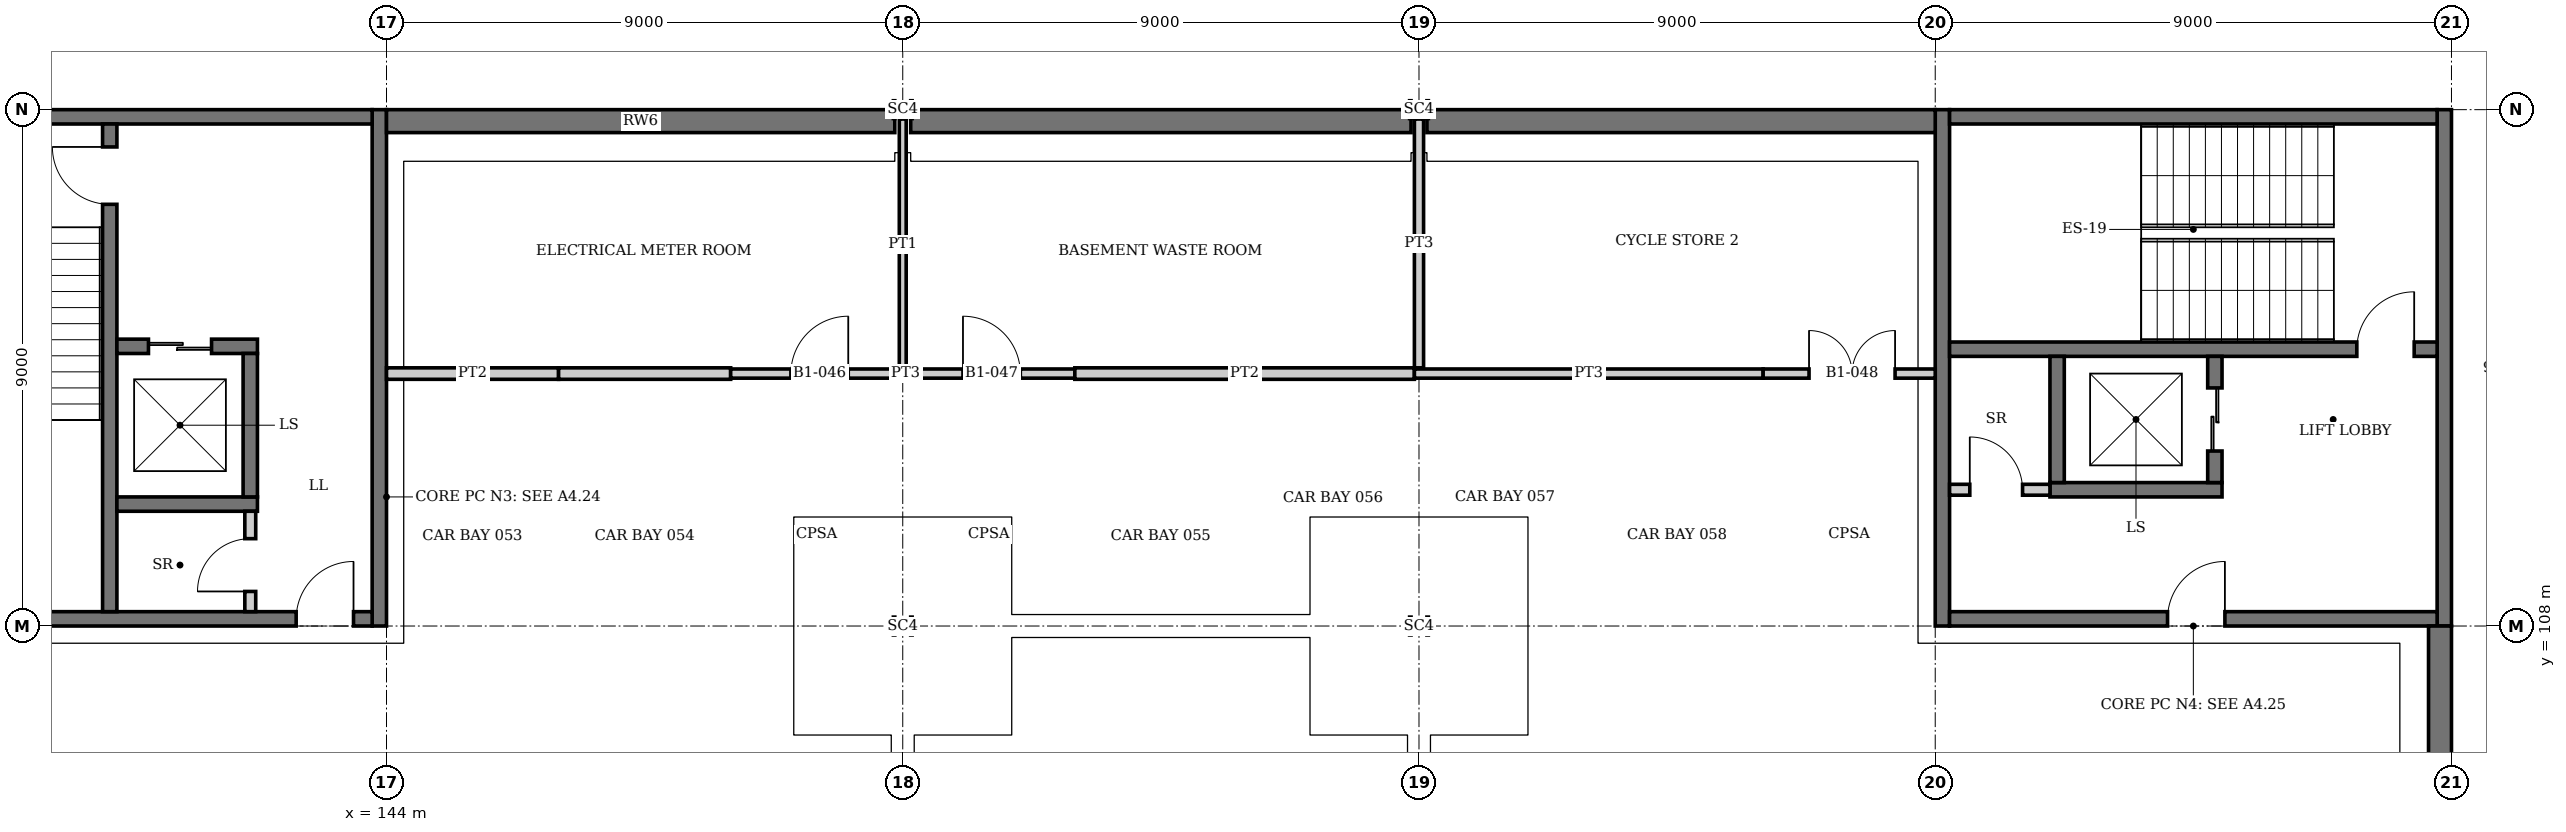
"""IFC4 building model, lengths in metres.
Left out: names, types, materials, properties, quantities, classifications, styles, units other than length and angle.
Written with IfcOpenShell. Run it as: python <this file> out.ifc"""

import sys

from ifc_helpers import new_model, si_unit, direction, frame, frame_2d, origin, origin_2d, place, context, subcontext, project, spatial, rectangle, i_section, extrude, element, fill, save


model = new_model("IFC4")
c1 = context("Model", 3, precision=1e-05, world=origin(), true_north=direction((0.0, 1.0)))
c2 = subcontext(c1, "Body", "Model", "MODEL_VIEW")
j1 = project(units=[si_unit("LENGTHUNIT", "METRE"), si_unit("PLANEANGLEUNIT", "RADIAN")], contexts=[c1])
p1 = place(None, origin())
s1 = spatial("IfcSite", under=j1, at=p1, CompositionType="ELEMENT")
p2 = place(p1, origin())
s2 = spatial("IfcBuilding", under=s1, at=p2, CompositionType="ELEMENT")
p3 = place(p2, frame((0.0, 0.0, -4.5)))
s3 = spatial("IfcBuildingStorey", under=s2, at=p3, CompositionType="ELEMENT", Elevation=-4.5)
for number, where, z_axis, x_axis in (
    (1, (153.0, 108.0, 0.0), (0.0, 0.0, 1.0), (0.0, 1.0, 0.0)),
    (2, (153.0, 117.0, 0.0), (0.0, 0.0, 1.0), (0.0, 1.0, 0.0)),
    (3, (162.0, 108.0, 0.0), (0.0, 0.0, 1.0), (0.0, 1.0, 0.0)),
    (4, (162.0, 117.0, 0.0), (0.0, 0.0, 1.0), (0.0, 1.0, 0.0)),
):
    element("IfcColumn", number, at=place(p3, frame(where, z_axis=z_axis, x_axis=x_axis)), inside=s3, PredefinedType="COLUMN", context=c2, shape_type="SweptSolid", body=[
        extrude(i_section(OverallWidth=0.311, OverallDepth=0.327, WebThickness=0.016, FlangeThickness=0.025, at=origin_2d()), origin(), (0.0, 0.0, 1.0), 4.5),
    ])
p4 = place(p3, frame((143.875, 108.0, 0.0), z_axis=(0.0, 0.0, 1.0), x_axis=(0.0, 1.0, 0.0)))
e5 = element("IfcWall", 5, at=p4, inside=s3, PredefinedType="SHEAR", context=c2, shape_type="SweptSolid", body=[
    extrude(rectangle(XDim=9.0, YDim=0.25, at=frame_2d((4.5, 0.0))), origin(), (0.0, 0.0, 1.0), 4.5),
])
p5 = place(p3, frame((135.25, 108.125, 0.0), z_axis=(0.0, 0.0, 1.0), x_axis=(1.0, 0.0, 0.0)))
e6 = element("IfcWall", 6, at=p5, inside=s3, PredefinedType="SHEAR", context=c2, shape_type="SweptSolid", body=[
    extrude(rectangle(XDim=8.5, YDim=0.25, at=frame_2d((4.25, 0.0))), origin(), (0.0, 0.0, 1.0), 4.5),
])
p6 = place(p5, frame((7.175, 0.0, 0.0)))
e7 = element("IfcOpeningElement", 7, at=p6, cuts=e6, PredefinedType="OPENING", context=c2, shape_type="SweptSolid", body=[
    extrude(rectangle(XDim=1.0, YDim=2.1, at=frame_2d((0.5, 1.05))), frame((0.0, 0.135, 0.0), z_axis=(0.0, -1.0, 0.0), x_axis=(1.0, 0.0, 0.0)), (0.0, 0.0, 1.0), 0.27),
])
p7 = place(p3, frame((135.25, 116.875, 0.0), z_axis=(0.0, 0.0, 1.0), x_axis=(1.0, 0.0, 0.0)))
e8 = element("IfcWall", 8, at=p7, inside=s3, PredefinedType="SHEAR", context=c2, shape_type="SweptSolid", body=[
    extrude(rectangle(XDim=8.5, YDim=0.25, at=frame_2d((4.25, 0.0))), origin(), (0.0, 0.0, 1.0), 4.5),
])
for number, where, z_axis, x_axis in (
    (9, (171.125, 108.0, 0.0), (0.0, 0.0, 1.0), (0.0, 1.0, 0.0)),
    (10, (179.875, 108.0, 0.0), (0.0, 0.0, 1.0), (0.0, 1.0, 0.0)),
):
    element("IfcWall", number, at=place(p3, frame(where, z_axis=z_axis, x_axis=x_axis)), inside=s3, PredefinedType="SHEAR", context=c2, shape_type="SweptSolid", body=[
        extrude(rectangle(XDim=9.0, YDim=0.25, at=frame_2d((4.5, 0.0))), origin(), (0.0, 0.0, 1.0), 4.5),
    ])
p8 = place(p3, frame((171.25, 108.125, 0.0), z_axis=(0.0, 0.0, 1.0), x_axis=(1.0, 0.0, 0.0)))
e11 = element("IfcWall", 11, at=p8, inside=s3, PredefinedType="SHEAR", context=c2, shape_type="SweptSolid", body=[
    extrude(rectangle(XDim=8.5, YDim=0.25, at=frame_2d((4.25, 0.0))), origin(), (0.0, 0.0, 1.0), 4.5),
])
p9 = place(p8, frame((3.8, 0.0, 0.0)))
e12 = element("IfcOpeningElement", 12, at=p9, cuts=e11, PredefinedType="OPENING", context=c2, shape_type="SweptSolid", body=[
    extrude(rectangle(XDim=1.0, YDim=2.1, at=frame_2d((0.5, 1.05))), frame((0.0, 0.135, 0.0), z_axis=(0.0, -1.0, 0.0), x_axis=(1.0, 0.0, 0.0)), (0.0, 0.0, 1.0), 0.27),
])
p10 = place(p3, frame((171.25, 116.875, 0.0), z_axis=(0.0, 0.0, 1.0), x_axis=(1.0, 0.0, 0.0)))
e13 = element("IfcWall", 13, at=p10, inside=s3, PredefinedType="SHEAR", context=c2, shape_type="SweptSolid", body=[
    extrude(rectangle(XDim=8.5, YDim=0.25, at=frame_2d((4.25, 0.0))), origin(), (0.0, 0.0, 1.0), 4.5),
])
p11 = place(p3, frame((144.0, 116.8, 0.0), z_axis=(0.0, 0.0, 1.0), x_axis=(1.0, 0.0, 0.0)))
e14 = element("IfcWall", 14, at=p11, inside=s3, PredefinedType="SOLIDWALL", context=c2, shape_type="SweptSolid", body=[
    extrude(rectangle(XDim=8.862, YDim=0.4, at=frame_2d((4.431, 0.0))), origin(), (0.0, 0.0, 1.0), 4.5),
])
p12 = place(p3, frame((153.138, 116.8, 0.0), z_axis=(0.0, 0.0, 1.0), x_axis=(1.0, 0.0, 0.0)))
e15 = element("IfcWall", 15, at=p12, inside=s3, PredefinedType="SOLIDWALL", context=c2, shape_type="SweptSolid", body=[
    extrude(rectangle(XDim=8.723, YDim=0.4, at=frame_2d((4.362, 0.0))), origin(), (0.0, 0.0, 1.0), 4.5),
])
p13 = place(p3, frame((162.138, 116.8, 0.0), z_axis=(0.0, 0.0, 1.0), x_axis=(1.0, 0.0, 0.0)))
e16 = element("IfcWall", 16, at=p13, inside=s3, PredefinedType="SOLIDWALL", context=c2, shape_type="SweptSolid", body=[
    extrude(rectangle(XDim=8.862, YDim=0.4, at=frame_2d((4.431, 0.0))), origin(), (0.0, 0.0, 1.0), 4.5),
])
p14 = place(p3, frame((179.8, 99.008, 0.0), z_axis=(0.0, 0.0, 1.0), x_axis=(0.0, 1.0, 0.0)))
e17 = element("IfcWall", 17, at=p14, inside=s3, PredefinedType="SOLIDWALL", context=c2, shape_type="SweptSolid", body=[
    extrude(rectangle(XDim=8.992, YDim=0.4, at=frame_2d((4.496, 0.0))), origin(), (0.0, 0.0, 1.0), 4.5),
])
p15 = place(p3, frame((139.175, 116.75, 0.0), z_axis=(0.0, 0.0, 1.0), x_axis=(0.0, -1.0, 0.0)))
e18 = element("IfcWall", 18, at=p15, inside=s3, PredefinedType="SOLIDWALL", context=c2, shape_type="SweptSolid", body=[
    extrude(rectangle(XDim=8.5, YDim=0.25, at=frame_2d((4.25, 0.0))), origin(), (0.0, 0.0, 1.0), 4.25),
])
p16 = place(p15, frame((0.4, 0.0, 0.0)))
e19 = element("IfcOpeningElement", 19, at=p16, cuts=e18, PredefinedType="OPENING", context=c2, shape_type="SweptSolid", body=[
    extrude(rectangle(XDim=1.0, YDim=2.1, at=frame_2d((0.5, 1.05))), frame((0.0, 0.135, 0.0), z_axis=(0.0, -1.0, 0.0), x_axis=(1.0, 0.0, 0.0)), (0.0, 0.0, 1.0), 0.27),
])
p17 = place(p3, frame((139.3, 110.125, 0.0), z_axis=(0.0, 0.0, 1.0), x_axis=(1.0, 0.0, 0.0)))
e20 = element("IfcWall", 20, at=p17, inside=s3, PredefinedType="SOLIDWALL", context=c2, shape_type="SweptSolid", body=[
    extrude(rectangle(XDim=2.45, YDim=0.25, at=frame_2d((1.225, 0.0))), origin(), (0.0, 0.0, 1.0), 4.5),
])
p18 = place(p3, frame((139.3, 112.875, 0.0), z_axis=(0.0, 0.0, 1.0), x_axis=(1.0, 0.0, 0.0)))
e21 = element("IfcWall", 21, at=p18, inside=s3, PredefinedType="SOLIDWALL", context=c2, shape_type="SweptSolid", body=[
    extrude(rectangle(XDim=2.45, YDim=0.25, at=frame_2d((1.225, 0.0))), origin(), (0.0, 0.0, 1.0), 4.5),
])
p19 = place(p18, frame((0.55, 0.0, 0.0)))
e22 = element("IfcOpeningElement", 22, at=p19, cuts=e21, PredefinedType="OPENING", context=c2, shape_type="SweptSolid", body=[
    extrude(rectangle(XDim=1.1, YDim=2.1, at=frame_2d((0.55, 1.05))), frame((0.0, 0.135, 0.0), z_axis=(0.0, -1.0, 0.0), x_axis=(1.0, 0.0, 0.0)), (0.0, 0.0, 1.0), 0.27),
])
p20 = place(p3, frame((141.625, 110.25, 0.0), z_axis=(0.0, 0.0, 1.0), x_axis=(0.0, 1.0, 0.0)))
e23 = element("IfcWall", 23, at=p20, inside=s3, PredefinedType="SOLIDWALL", context=c2, shape_type="SweptSolid", body=[
    extrude(rectangle(XDim=2.5, YDim=0.25, at=frame_2d((1.25, 0.0))), origin(), (0.0, 0.0, 1.0), 4.5),
])
p21 = place(p3, frame((179.75, 112.825, 0.0), z_axis=(0.0, 0.0, 1.0), x_axis=(-1.0, 0.0, 0.0)))
e24 = element("IfcWall", 24, at=p21, inside=s3, PredefinedType="SOLIDWALL", context=c2, shape_type="SweptSolid", body=[
    extrude(rectangle(XDim=8.5, YDim=0.25, at=frame_2d((4.25, 0.0))), origin(), (0.0, 0.0, 1.0), 4.25),
])
p22 = place(p21, frame((0.4, 0.0, 0.0)))
e25 = element("IfcOpeningElement", 25, at=p22, cuts=e24, PredefinedType="OPENING", context=c2, shape_type="SweptSolid", body=[
    extrude(rectangle(XDim=1.0, YDim=2.1, at=frame_2d((0.5, 1.05))), frame((0.0, 0.135, 0.0), z_axis=(0.0, -1.0, 0.0), x_axis=(1.0, 0.0, 0.0)), (0.0, 0.0, 1.0), 0.27),
])
p23 = place(p3, frame((173.0, 110.375, 0.0), z_axis=(0.0, 0.0, 1.0), x_axis=(1.0, 0.0, 0.0)))
e26 = element("IfcWall", 26, at=p23, inside=s3, PredefinedType="SOLIDWALL", context=c2, shape_type="SweptSolid", body=[
    extrude(rectangle(XDim=3.0, YDim=0.25, at=frame_2d((1.5, 0.0))), origin(), (0.0, 0.0, 1.0), 4.5),
])
p24 = place(p3, frame((173.125, 110.5, 0.0), z_axis=(0.0, 0.0, 1.0), x_axis=(0.0, 1.0, 0.0)))
e27 = element("IfcWall", 27, at=p24, inside=s3, PredefinedType="SOLIDWALL", context=c2, shape_type="SweptSolid", body=[
    extrude(rectangle(XDim=2.2, YDim=0.25, at=frame_2d((1.1, 0.0))), origin(), (0.0, 0.0, 1.0), 4.5),
])
p25 = place(p3, frame((175.875, 110.5, 0.0), z_axis=(0.0, 0.0, 1.0), x_axis=(0.0, 1.0, 0.0)))
e28 = element("IfcWall", 28, at=p25, inside=s3, PredefinedType="SOLIDWALL", context=c2, shape_type="SweptSolid", body=[
    extrude(rectangle(XDim=2.2, YDim=0.25, at=frame_2d((1.1, 0.0))), origin(), (0.0, 0.0, 1.0), 4.5),
])
p26 = place(p25, frame((0.55, 0.0, 0.0)))
e29 = element("IfcOpeningElement", 29, at=p26, cuts=e28, PredefinedType="OPENING", context=c2, shape_type="SweptSolid", body=[
    extrude(rectangle(XDim=1.1, YDim=2.1, at=frame_2d((0.55, 1.05))), frame((0.0, 0.135, 0.0), z_axis=(0.0, -1.0, 0.0), x_axis=(1.0, 0.0, 0.0)), (0.0, 0.0, 1.0), 0.27),
])
p27 = place(p3, frame((171.25, 110.375, 0.0), z_axis=(0.0, 0.0, 1.0), x_axis=(1.0, 0.0, 0.0)))
e30 = element("IfcWall", 30, at=p27, inside=s3, PredefinedType="PARTITIONING", context=c2, shape_type="SweptSolid", body=[
    extrude(rectangle(XDim=1.75, YDim=0.19, at=frame_2d((0.875, 0.0))), origin(), (0.0, 0.0, 1.0), 4.25),
])
p28 = place(p27, frame((0.353, 0.0, 0.0)))
e31 = element("IfcOpeningElement", 31, at=p28, cuts=e30, PredefinedType="OPENING", context=c2, shape_type="SweptSolid", body=[
    extrude(rectangle(XDim=0.92, YDim=2.1, at=frame_2d((0.46, 1.05))), frame((0.0, 0.105, 0.0), z_axis=(0.0, -1.0, 0.0), x_axis=(1.0, 0.0, 0.0)), (0.0, 0.0, 1.0), 0.21),
])
p29 = place(p3, frame((144.0, 112.4, 0.0), z_axis=(0.0, 0.0, 1.0), x_axis=(1.0, 0.0, 0.0)))
e32 = element("IfcWall", 32, at=p29, inside=s3, PredefinedType="PARTITIONING", context=c2, shape_type="SweptSolid", body=[
    extrude(rectangle(XDim=3.0, YDim=0.2, at=frame_2d((1.5, 0.0))), origin(), (0.0, 0.0, 1.0), 4.25),
])
p30 = place(p3, frame((147.0, 112.4, 0.0), z_axis=(0.0, 0.0, 1.0), x_axis=(1.0, 0.0, 0.0)))
e33 = element("IfcWall", 33, at=p30, inside=s3, PredefinedType="PARTITIONING", context=c2, shape_type="SweptSolid", body=[
    extrude(rectangle(XDim=3.0, YDim=0.2, at=frame_2d((1.5, 0.0))), origin(), (0.0, 0.0, 1.0), 3.79),
])
p31 = place(p3, frame((150.0, 112.4, 0.0), z_axis=(0.0, 0.0, 1.0), x_axis=(1.0, 0.0, 0.0)))
e34 = element("IfcWall", 34, at=p31, inside=s3, PredefinedType="PARTITIONING", context=c2, shape_type="SweptSolid", body=[
    extrude(rectangle(XDim=6.0, YDim=0.16, at=frame_2d((3.0, 0.0))), origin(), (0.0, 0.0, 1.0), 3.79),
])
p32 = place(p31, frame((1.05, 0.0, 0.0)))
e35 = element("IfcOpeningElement", 35, at=p32, cuts=e34, PredefinedType="OPENING", context=c2, shape_type="SweptSolid", body=[
    extrude(rectangle(XDim=1.0, YDim=2.1, at=frame_2d((0.5, 1.05))), frame((0.0, 0.09, 0.0), z_axis=(0.0, -1.0, 0.0), x_axis=(1.0, 0.0, 0.0)), (0.0, 0.0, 1.0), 0.18),
])
p33 = place(p31, frame((4.05, 0.0, 0.0)))
e36 = element("IfcOpeningElement", 36, at=p33, cuts=e34, PredefinedType="OPENING", context=c2, shape_type="SweptSolid", body=[
    extrude(rectangle(XDim=1.0, YDim=2.1, at=frame_2d((0.5, 1.05))), frame((0.0, 0.09, 0.0), z_axis=(0.0, -1.0, 0.0), x_axis=(1.0, 0.0, 0.0)), (0.0, 0.0, 1.0), 0.18),
])
p34 = place(p3, frame((156.0, 112.4, 0.0), z_axis=(0.0, 0.0, 1.0), x_axis=(1.0, 0.0, 0.0)))
e37 = element("IfcWall", 37, at=p34, inside=s3, PredefinedType="PARTITIONING", context=c2, shape_type="SweptSolid", body=[
    extrude(rectangle(XDim=5.92, YDim=0.2, at=frame_2d((2.96, 0.0))), origin(), (0.0, 0.0, 1.0), 3.79),
])
p35 = place(p3, frame((161.92, 112.4, 0.0), z_axis=(0.0, 0.0, 1.0), x_axis=(1.0, 0.0, 0.0)))
e38 = element("IfcWall", 38, at=p35, inside=s3, PredefinedType="PARTITIONING", context=c2, shape_type="SweptSolid", body=[
    extrude(rectangle(XDim=6.08, YDim=0.16, at=frame_2d((3.04, 0.0))), origin(), (0.0, 0.0, 1.0), 3.79),
])
p36 = place(p3, frame((168.0, 112.4, 0.0), z_axis=(0.0, 0.0, 1.0), x_axis=(1.0, 0.0, 0.0)))
e39 = element("IfcWall", 39, at=p36, inside=s3, PredefinedType="PARTITIONING", context=c2, shape_type="SweptSolid", body=[
    extrude(rectangle(XDim=3.0, YDim=0.16, at=frame_2d((1.5, 0.0))), origin(), (0.0, 0.0, 1.0), 4.25),
])
p37 = place(p36, frame((0.8, 0.0, 0.0)))
e40 = element("IfcOpeningElement", 40, at=p37, cuts=e39, PredefinedType="OPENING", context=c2, shape_type="SweptSolid", body=[
    extrude(rectangle(XDim=1.5, YDim=2.1, at=frame_2d((0.75, 1.05))), frame((0.0, 0.09, 0.0), z_axis=(0.0, -1.0, 0.0), x_axis=(1.0, 0.0, 0.0)), (0.0, 0.0, 1.0), 0.18),
])
p38 = place(p3, frame((141.625, 108.25, 0.0), z_axis=(0.0, 0.0, 1.0), x_axis=(0.0, 1.0, 0.0)))
e41 = element("IfcWall", 41, at=p38, inside=s3, PredefinedType="PARTITIONING", context=c2, shape_type="SweptSolid", body=[
    extrude(rectangle(XDim=1.75, YDim=0.19, at=frame_2d((0.875, 0.0))), origin(), (0.0, 0.0, 1.0), 4.25),
])
p39 = place(p38, frame((0.353, 0.0, 0.0)))
e42 = element("IfcOpeningElement", 42, at=p39, cuts=e41, PredefinedType="OPENING", context=c2, shape_type="SweptSolid", body=[
    extrude(rectangle(XDim=0.92, YDim=2.1, at=frame_2d((0.46, 1.05))), frame((0.0, 0.105, 0.0), z_axis=(0.0, -1.0, 0.0), x_axis=(1.0, 0.0, 0.0)), (0.0, 0.0, 1.0), 0.21),
])
p40 = place(p3, frame((153.0, 112.48, 0.0), z_axis=(0.0, 0.0, 1.0), x_axis=(0.0, 1.0, 0.0)))
e43 = element("IfcWall", 43, at=p40, inside=s3, PredefinedType="PARTITIONING", context=c2, shape_type="SweptSolid", body=[
    extrude(rectangle(XDim=4.356, YDim=0.12, at=frame_2d((2.178, 0.0))), origin(), (0.0, 0.0, 1.0), 3.79),
])
p41 = place(p3, frame((162.0, 112.5, 0.0), z_axis=(0.0, 0.0, 1.0), x_axis=(0.0, 1.0, 0.0)))
e44 = element("IfcWall", 44, at=p41, inside=s3, PredefinedType="PARTITIONING", context=c2, shape_type="SweptSolid", body=[
    extrude(rectangle(XDim=4.336, YDim=0.16, at=frame_2d((2.168, 0.0))), origin(), (0.0, 0.0, 1.0), 3.79),
])
p42 = place(p19, origin())
e45 = element("IfcDoor", 45, at=p42, inside=s3, OperationType="DOUBLE_DOOR_SLIDING", PredefinedType="DOOR", context=c2, shape_type="SweptSolid", body=[
    extrude(rectangle(XDim=1.1, YDim=2.1, at=frame_2d((0.55, 1.05))), frame((0.0, 0.025, 0.0), z_axis=(0.0, -1.0, 0.0), x_axis=(1.0, 0.0, 0.0)), (0.0, 0.0, 1.0), 0.05),
])
fill(e22, e45)
p43 = place(p26, origin())
e46 = element("IfcDoor", 46, at=p43, inside=s3, OperationType="DOUBLE_DOOR_SLIDING", PredefinedType="DOOR", context=c2, shape_type="SweptSolid", body=[
    extrude(rectangle(XDim=1.1, YDim=2.1, at=frame_2d((0.55, 1.05))), frame((0.0, 0.025, 0.0), z_axis=(0.0, -1.0, 0.0), x_axis=(1.0, 0.0, 0.0)), (0.0, 0.0, 1.0), 0.05),
])
fill(e29, e46)
p44 = place(p16, frame((1.0, 0.0, 0.0), z_axis=(0.0, 0.0, 1.0), x_axis=(-1.0, 0.0, 0.0)))
e47 = element("IfcDoor", 47, at=p44, inside=s3, OperationType="SINGLE_SWING_RIGHT", PredefinedType="DOOR", context=c2, shape_type="SweptSolid", body=[
    extrude(rectangle(XDim=1.0, YDim=2.1, at=frame_2d((0.5, 1.05))), frame((0.0, 0.025, 0.0), z_axis=(0.0, -1.0, 0.0), x_axis=(1.0, 0.0, 0.0)), (0.0, 0.0, 1.0), 0.05),
])
fill(e19, e47)
p45 = place(p39, origin())
e48 = element("IfcDoor", 48, at=p45, inside=s3, OperationType="SINGLE_SWING_LEFT", PredefinedType="DOOR", context=c2, shape_type="SweptSolid", body=[
    extrude(rectangle(XDim=0.92, YDim=2.1, at=frame_2d((0.46, 1.05))), frame((0.0, 0.025, 0.0), z_axis=(0.0, -1.0, 0.0), x_axis=(1.0, 0.0, 0.0)), (0.0, 0.0, 1.0), 0.05),
])
fill(e42, e48)
p46 = place(p22, frame((1.0, 0.0, 0.0), z_axis=(0.0, 0.0, 1.0), x_axis=(-1.0, 0.0, 0.0)))
e49 = element("IfcDoor", 49, at=p46, inside=s3, OperationType="SINGLE_SWING_RIGHT", PredefinedType="DOOR", context=c2, shape_type="SweptSolid", body=[
    extrude(rectangle(XDim=1.0, YDim=2.1, at=frame_2d((0.5, 1.05))), frame((0.0, 0.025, 0.0), z_axis=(0.0, -1.0, 0.0), x_axis=(1.0, 0.0, 0.0)), (0.0, 0.0, 1.0), 0.05),
])
fill(e25, e49)
p47 = place(p28, origin())
e50 = element("IfcDoor", 50, at=p47, inside=s3, OperationType="SINGLE_SWING_LEFT", PredefinedType="DOOR", context=c2, shape_type="SweptSolid", body=[
    extrude(rectangle(XDim=0.92, YDim=2.1, at=frame_2d((0.46, 1.05))), frame((0.0, 0.025, 0.0), z_axis=(0.0, -1.0, 0.0), x_axis=(1.0, 0.0, 0.0)), (0.0, 0.0, 1.0), 0.05),
])
fill(e31, e50)
p48 = place(p6, origin())
e51 = element("IfcDoor", 51, at=p48, inside=s3, OperationType="SINGLE_SWING_RIGHT", PredefinedType="DOOR", context=c2, shape_type="SweptSolid", body=[
    extrude(rectangle(XDim=1.0, YDim=2.1, at=frame_2d((0.5, 1.05))), frame((0.0, 0.025, 0.0), z_axis=(0.0, -1.0, 0.0), x_axis=(1.0, 0.0, 0.0)), (0.0, 0.0, 1.0), 0.05),
])
fill(e7, e51)
p49 = place(p9, origin())
e52 = element("IfcDoor", 52, at=p49, inside=s3, OperationType="SINGLE_SWING_RIGHT", PredefinedType="DOOR", context=c2, shape_type="SweptSolid", body=[
    extrude(rectangle(XDim=1.0, YDim=2.1, at=frame_2d((0.5, 1.05))), frame((0.0, 0.025, 0.0), z_axis=(0.0, -1.0, 0.0), x_axis=(1.0, 0.0, 0.0)), (0.0, 0.0, 1.0), 0.05),
])
fill(e12, e52)
p50 = place(p32, origin())
e53 = element("IfcDoor", 53, at=p50, inside=s3, OperationType="SINGLE_SWING_RIGHT", PredefinedType="DOOR", context=c2, shape_type="SweptSolid", body=[
    extrude(rectangle(XDim=1.0, YDim=2.1, at=frame_2d((0.5, 1.05))), frame((0.0, 0.025, 0.0), z_axis=(0.0, -1.0, 0.0), x_axis=(1.0, 0.0, 0.0)), (0.0, 0.0, 1.0), 0.05),
])
fill(e35, e53)
p51 = place(p33, origin())
e54 = element("IfcDoor", 54, at=p51, inside=s3, OperationType="SINGLE_SWING_LEFT", PredefinedType="DOOR", context=c2, shape_type="SweptSolid", body=[
    extrude(rectangle(XDim=1.0, YDim=2.1, at=frame_2d((0.5, 1.05))), frame((0.0, 0.025, 0.0), z_axis=(0.0, -1.0, 0.0), x_axis=(1.0, 0.0, 0.0)), (0.0, 0.0, 1.0), 0.05),
])
fill(e36, e54)
p52 = place(p37, origin())
e55 = element("IfcDoor", 55, at=p52, inside=s3, OperationType="DOUBLE_DOOR_SINGLE_SWING", PredefinedType="DOOR", context=c2, shape_type="SweptSolid", body=[
    extrude(rectangle(XDim=1.5, YDim=2.1, at=frame_2d((0.75, 1.05))), frame((0.0, 0.025, 0.0), z_axis=(0.0, -1.0, 0.0), x_axis=(1.0, 0.0, 0.0)), (0.0, 0.0, 1.0), 0.05),
])
fill(e40, e55)
save(model, sys.argv[1])
